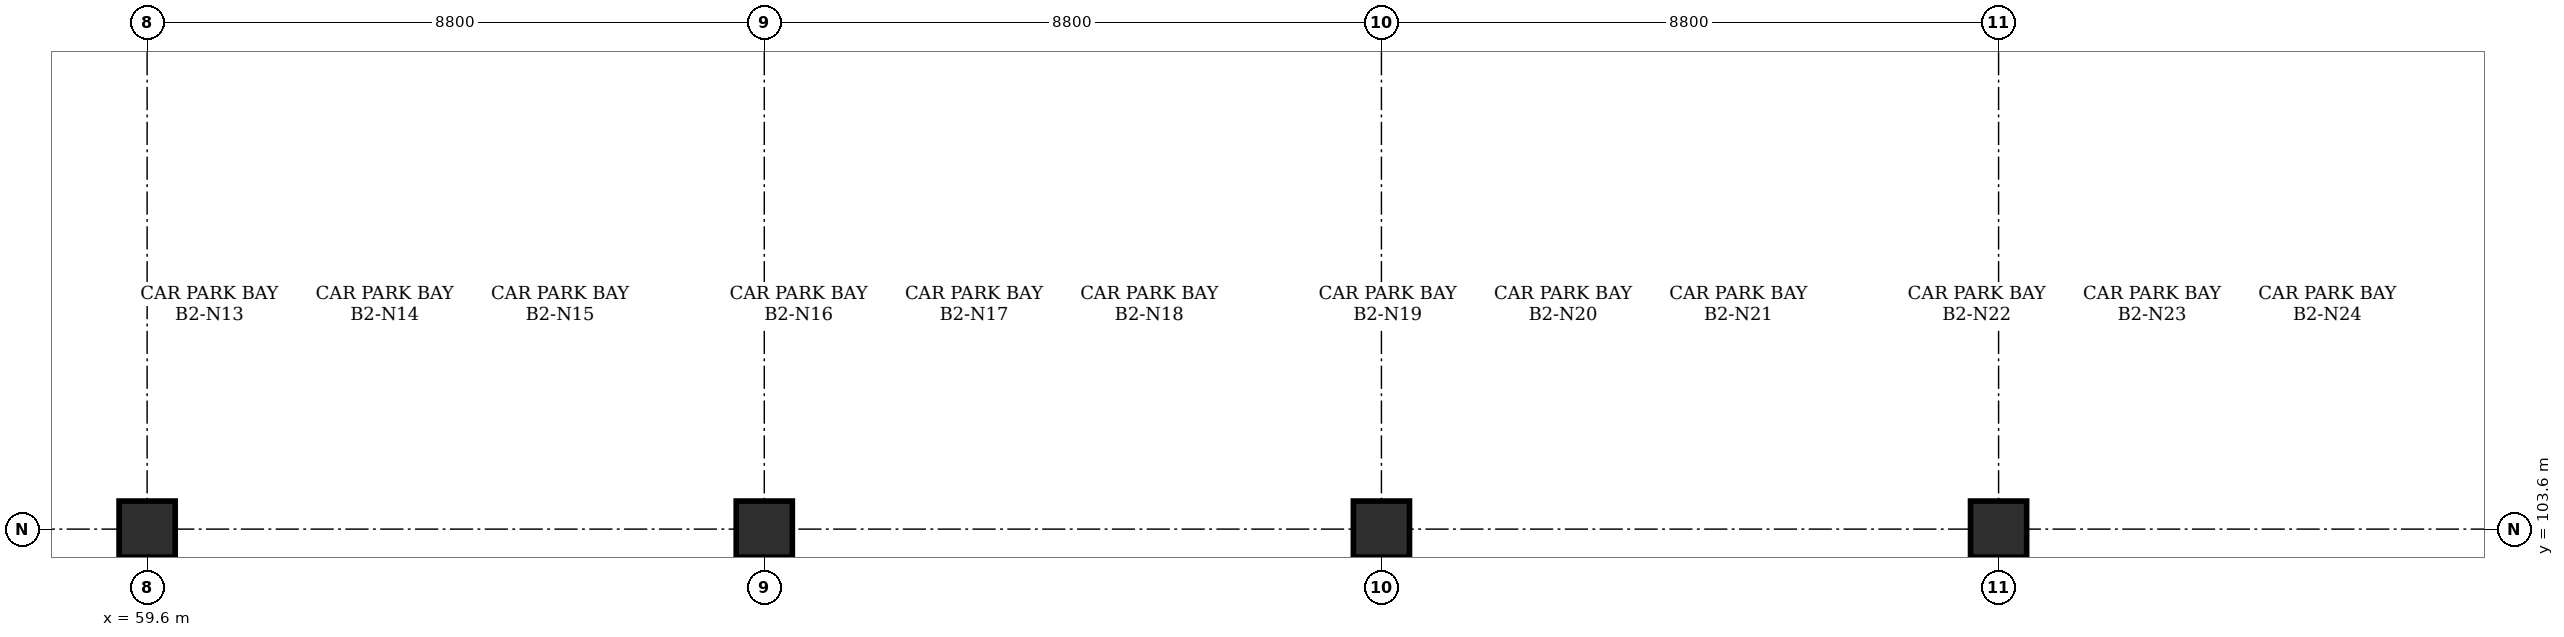
"""IFC4 building model, lengths in metres.
Left out: names, types, materials, properties, quantities, classifications, styles, units other than length and angle.
Written with IfcOpenShell. Run it as: python <this file> out.ifc"""

import sys

from ifc_helpers import new_model, si_unit, direction, frame, origin, origin_2d, place, context, subcontext, project, spatial, rectangle, extrude, element, save


model = new_model("IFC4")
c1 = context("Model", 3, precision=1e-05, world=origin(), true_north=direction((0.0, 1.0)))
c2 = subcontext(c1, "Body", "Model", "MODEL_VIEW")
j1 = project(units=[si_unit("LENGTHUNIT", "METRE"), si_unit("PLANEANGLEUNIT", "RADIAN")], contexts=[c1])
p1 = place(None, origin())
s1 = spatial("IfcSite", under=j1, at=p1, CompositionType="ELEMENT")
p2 = place(p1, origin())
s2 = spatial("IfcBuilding", under=s1, at=p2, CompositionType="ELEMENT")
p3 = place(p2, frame((0.0, 0.0, -9.6)))
s3 = spatial("IfcBuildingStorey", under=s2, at=p3, CompositionType="ELEMENT", Elevation=-9.6)
for number, where, z_axis, x_axis in (
    (1, (59.6, 103.6, 0.0), (0.0, 0.0, 1.0), (1.0, 0.0, 0.0)),
    (2, (68.4, 103.6, 0.0), (0.0, 0.0, 1.0), (1.0, 0.0, 0.0)),
    (3, (77.2, 103.6, 0.0), (0.0, 0.0, 1.0), (1.0, 0.0, 0.0)),
    (4, (86.0, 103.6, 0.0), (0.0, 0.0, 1.0), (1.0, 0.0, 0.0)),
):
    element("IfcColumn", number, at=place(p3, frame(where, z_axis=z_axis, x_axis=x_axis)), inside=s3, PredefinedType="COLUMN", context=c2, shape_type="SweptSolid", body=[
        extrude(rectangle(XDim=0.8, YDim=0.8, at=origin_2d()), origin(), (0.0, 0.0, 1.0), 4.48),
    ])
save(model, sys.argv[1])
